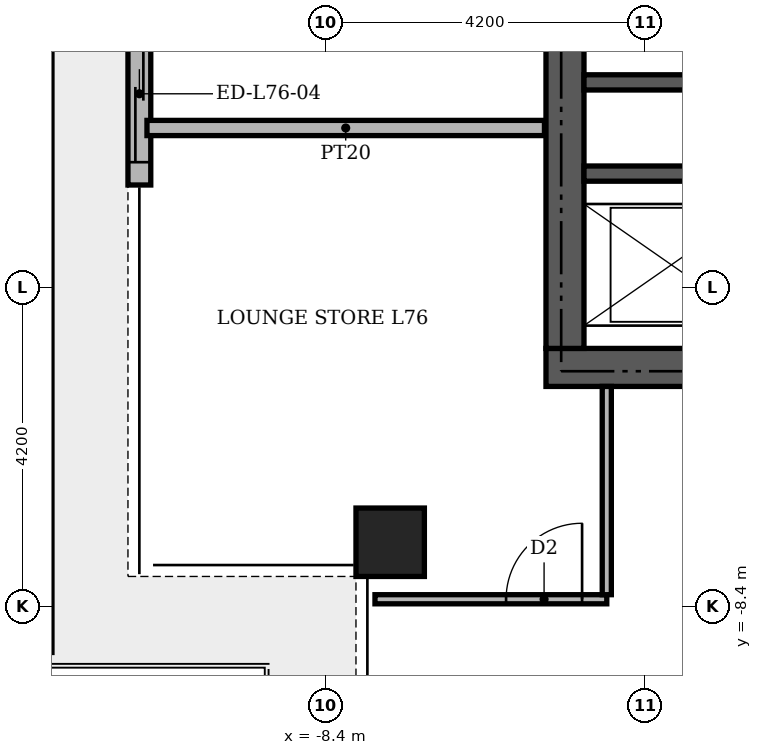
"""IFC4 building model, lengths in metres.
Left out: names, types, materials, properties, quantities, classifications, styles, units other than length and angle.
Written with IfcOpenShell. Run it as: python <this file> out.ifc"""

import sys

from ifc_helpers import new_model, si_unit, direction, frame, frame_2d, origin, origin_2d, place, context, subcontext, project, spatial, rectangle, extrude, element, fill, save


model = new_model("IFC4")
c1 = context("Model", 3, precision=1e-05, world=origin(), true_north=direction((0.0, 1.0)))
c2 = subcontext(c1, "Body", "Model", "MODEL_VIEW")
j1 = project(units=[si_unit("LENGTHUNIT", "METRE"), si_unit("PLANEANGLEUNIT", "RADIAN")], contexts=[c1])
p1 = place(None, origin())
s1 = spatial("IfcSite", under=j1, at=p1, CompositionType="ELEMENT")
p2 = place(p1, origin())
s2 = spatial("IfcBuilding", under=s1, at=p2, CompositionType="ELEMENT")
p3 = place(p2, frame((0.0, 0.0, 316.2)))
s3 = spatial("IfcBuildingStorey", under=s2, at=p3, CompositionType="ELEMENT", Elevation=316.2)
p4 = place(p3, frame((-5.5, -5.25, 0.0), z_axis=(0.0, 0.0, 1.0), x_axis=(1.0, 0.0, 0.0)))
e1 = element("IfcWall", 1, at=p4, inside=s3, PredefinedType="SHEAR", context=c2, shape_type="SweptSolid", body=[
    extrude(rectangle(XDim=11.0, YDim=0.5, at=frame_2d((5.5, 0.0))), origin(), (0.0, 0.0, 1.0), 5.0),
])
p5 = place(p4, frame((4.9, 0.0, 0.0)))
e2 = element("IfcOpeningElement", 2, at=p5, cuts=e1, PredefinedType="OPENING", context=c2, shape_type="SweptSolid", body=[
    extrude(rectangle(XDim=1.2, YDim=2.1, at=frame_2d((0.6, 1.05))), frame((0.0, 0.26, 0.0), z_axis=(0.0, -1.0, 0.0), x_axis=(1.0, 0.0, 0.0)), (0.0, 0.0, 1.0), 0.52),
])
p6 = place(p3, frame((-5.25, -5.0, 0.0), z_axis=(0.0, 0.0, 1.0), x_axis=(0.0, 1.0, 0.0)))
e3 = element("IfcWall", 3, at=p6, inside=s3, PredefinedType="SHEAR", context=c2, shape_type="SweptSolid", body=[
    extrude(rectangle(XDim=10.5, YDim=0.5, at=frame_2d((5.25, 0.0))), origin(), (0.0, 0.0, 1.0), 5.0),
])
p7 = place(p3, frame((-5.0, -1.5, 0.0), z_axis=(0.0, 0.0, 1.0), x_axis=(1.0, 0.0, 0.0)))
e4 = element("IfcWall", 4, at=p7, inside=s3, PredefinedType="SHEAR", context=c2, shape_type="SweptSolid", body=[
    extrude(rectangle(XDim=3.05, YDim=0.2, at=frame_2d((1.525, 0.0))), origin(), (0.0, 0.0, 1.0), 5.0),
])
p8 = place(p3, frame((-5.0, -2.7, 0.0), z_axis=(0.0, 0.0, 1.0), x_axis=(1.0, 0.0, 0.0)))
e5 = element("IfcWall", 5, at=p8, inside=s3, PredefinedType="SHEAR", context=c2, shape_type="SweptSolid", body=[
    extrude(rectangle(XDim=2.85, YDim=0.2, at=frame_2d((1.425, 0.0))), origin(), (0.0, 0.0, 1.0), 5.0),
])
p9 = place(p3, frame((-7.55, -7.55, -0.35), z_axis=(0.0, 0.0, 1.0), x_axis=(1.0, 0.0, 0.0)))
e6 = element("IfcColumn", 6, at=p9, inside=s3, PredefinedType="COLUMN", context=c2, shape_type="SweptSolid", body=[
    extrude(rectangle(XDim=0.9, YDim=0.9, at=origin_2d()), origin(), (0.0, 0.0, 1.0), 5.75),
])
p10 = place(p3, frame((-10.85, -0.45, 0.0), z_axis=(0.0, 0.0, 1.0), x_axis=(0.0, -1.0, 0.0)))
e7 = element("IfcWall", 7, at=p10, inside=s3, PredefinedType="STANDARD", context=c2, shape_type="SweptSolid", body=[
    extrude(rectangle(XDim=2.4, YDim=0.3, at=frame_2d((1.2, 0.0))), origin(), (0.0, 0.0, 1.0), 5.0),
])
p11 = place(p10, frame((0.3, 0.0, 0.0)))
e8 = element("IfcOpeningElement", 8, at=p11, cuts=e7, PredefinedType="OPENING", context=c2, shape_type="SweptSolid", body=[
    extrude(rectangle(XDim=1.8, YDim=2.4, at=frame_2d((0.9, 1.2))), frame((0.0, 0.16, 0.0), z_axis=(0.0, -1.0, 0.0), x_axis=(1.0, 0.0, 0.0)), (0.0, 0.0, 1.0), 0.32),
])
p12 = place(p3, frame((-7.75, -8.3, 0.0), z_axis=(0.0, 0.0, 1.0), x_axis=(1.0, 0.0, 0.0)))
e9 = element("IfcWall", 9, at=p12, inside=s3, PredefinedType="PARTITIONING", context=c2, shape_type="SweptSolid", body=[
    extrude(rectangle(XDim=3.05, YDim=0.12, at=frame_2d((1.525, 0.0))), origin(), (0.0, 0.0, 1.0), 5.0),
])
p13 = place(p12, frame((1.725, 0.0, 0.0)))
e10 = element("IfcOpeningElement", 10, at=p13, cuts=e9, PredefinedType="OPENING", context=c2, shape_type="SweptSolid", body=[
    extrude(rectangle(XDim=1.0, YDim=2.1, at=frame_2d((0.5, 1.05))), frame((0.0, 0.07, 0.0), z_axis=(0.0, -1.0, 0.0), x_axis=(1.0, 0.0, 0.0)), (0.0, 0.0, 1.0), 0.14),
])
p14 = place(p3, frame((-4.7, -8.24, 0.0), z_axis=(0.0, 0.0, 1.0), x_axis=(0.0, 1.0, 0.0)))
e11 = element("IfcWall", 11, at=p14, inside=s3, PredefinedType="PARTITIONING", context=c2, shape_type="SweptSolid", body=[
    extrude(rectangle(XDim=2.74, YDim=0.12, at=frame_2d((1.37, 0.0))), origin(), (0.0, 0.0, 1.0), 5.0),
])
p15 = place(p3, frame((-10.75, -2.1, 0.0), z_axis=(0.0, 0.0, 1.0), x_axis=(1.0, 0.0, 0.0)))
e12 = element("IfcWall", 12, at=p15, inside=s3, PredefinedType="PARTITIONING", context=c2, shape_type="SweptSolid", body=[
    extrude(rectangle(XDim=5.23, YDim=0.2, at=frame_2d((2.615, 0.0))), origin(), (0.0, 0.0, 1.0), 5.0),
])
p16 = place(p11, origin())
e13 = element("IfcDoor", 13, at=p16, inside=s3, OperationType="SLIDING_TO_LEFT", PredefinedType="DOOR", context=c2, shape_type="SweptSolid", body=[
    extrude(rectangle(XDim=1.8, YDim=2.4, at=frame_2d((0.9, 1.2))), frame((0.0, 0.025, 0.0), z_axis=(0.0, -1.0, 0.0), x_axis=(1.0, 0.0, 0.0)), (0.0, 0.0, 1.0), 0.05),
])
fill(e8, e13)
p17 = place(p13, origin())
e14 = element("IfcDoor", 14, at=p17, inside=s3, OperationType="SINGLE_SWING_RIGHT", PredefinedType="DOOR", context=c2, shape_type="SweptSolid", body=[
    extrude(rectangle(XDim=1.0, YDim=2.1, at=frame_2d((0.5, 1.05))), frame((0.0, 0.025, 0.0), z_axis=(0.0, -1.0, 0.0), x_axis=(1.0, 0.0, 0.0)), (0.0, 0.0, 1.0), 0.05),
])
fill(e10, e14)
save(model, sys.argv[1])
